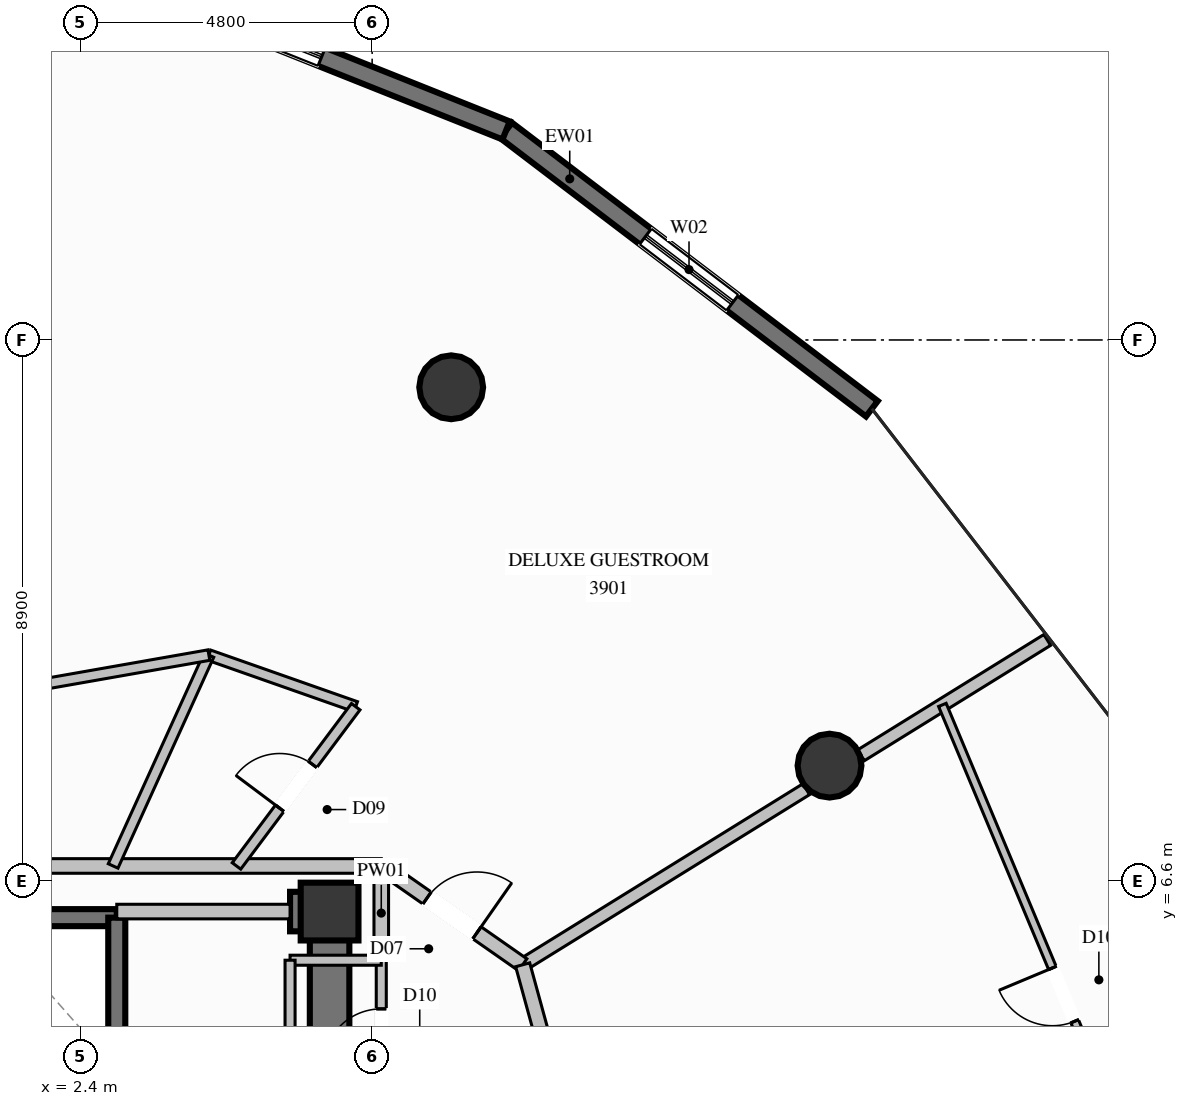
"""IFC4 building model, lengths in metres.
Left out: names, types, materials, properties, quantities, classifications, styles, units other than length and angle.
Written with IfcOpenShell. Run it as: python <this file> out.ifc"""

import sys

from ifc_helpers import new_model, si_unit, direction, frame, frame_2d, origin, origin_2d, place, context, subcontext, project, spatial, rectangle, circle, extrude, element, fill, save


model = new_model("IFC4")
c1 = context("Model", 3, precision=1e-05, world=origin(), true_north=direction((0.0, 1.0)))
c2 = subcontext(c1, "Body", "Model", "MODEL_VIEW")
j1 = project(units=[si_unit("LENGTHUNIT", "METRE"), si_unit("PLANEANGLEUNIT", "RADIAN")], contexts=[c1])
p1 = place(None, origin())
s1 = spatial("IfcSite", under=j1, at=p1, CompositionType="ELEMENT")
p2 = place(p1, origin())
s2 = spatial("IfcBuilding", under=s1, at=p2, CompositionType="ELEMENT")
p3 = place(p2, frame((0.0, 0.0, 145.8)))
s3 = spatial("IfcBuildingStorey", under=s2, at=p3, CompositionType="ELEMENT", Elevation=145.8)
p4 = place(p3, frame((6.5, 6.1, 0.0), z_axis=(0.0, 0.0, 1.0), x_axis=(1.0, 0.0, 0.0)))
e1 = element("IfcColumn", 1, at=p4, inside=s3, PredefinedType="COLUMN", context=c2, shape_type="SweptSolid", body=[
    extrude(rectangle(XDim=0.95, YDim=0.95, at=origin_2d()), origin(), (0.0, 0.0, 1.0), 3.6),
])
p5 = place(p3, frame((5.85, 6.1, 0.0), z_axis=(0.0, 0.0, 1.0), x_axis=(1.0, 0.0, 0.0)))
e2 = element("IfcWall", 2, at=p5, inside=s3, PredefinedType="SHEAR", context=c2, shape_type="SweptSolid", body=[
    extrude(rectangle(XDim=0.325, YDim=0.65, at=frame_2d((0.163, 0.0))), origin(), (0.0, 0.0, 1.0), 3.6),
])
p6 = place(p3, frame((6.5, 3.35, 0.0), z_axis=(0.0, 0.0, 1.0), x_axis=(0.0, 1.0, 0.0)))
e3 = element("IfcWall", 3, at=p6, inside=s3, PredefinedType="SHEAR", context=c2, shape_type="SweptSolid", body=[
    extrude(rectangle(XDim=3.075, YDim=0.65, at=frame_2d((1.538, 0.0))), origin(), (0.0, 0.0, 1.0), 3.6),
])
for number, where, z_axis, x_axis in (
    (4, (14.722, 8.5, 0.0), (0.0, 0.0, 1.0), (1.0, 0.0, 0.0)),
    (5, (8.5, 14.722, 0.0), (0.0, 0.0, 1.0), (1.0, 0.0, 0.0)),
):
    element("IfcColumn", number, at=place(p3, frame(where, z_axis=z_axis, x_axis=x_axis)), inside=s3, PredefinedType="COLUMN", context=c2, shape_type="SweptSolid", body=[
        extrude(circle(Radius=0.525, at=origin_2d()), origin(), (0.0, 0.0, 1.0), 3.6),
    ])
p7 = place(p3, frame((9.403, 18.946, 0.0), z_axis=(0.0, 0.0, 1.0), x_axis=(0.795837829304, -0.605509826054, 0.0)))
e6 = element("IfcWall", 6, at=p7, inside=s3, PredefinedType="SOLIDWALL", context=c2, shape_type="SweptSolid", body=[
    extrude(rectangle(XDim=7.559, YDim=0.32, at=frame_2d((3.78, 0.0))), origin(), (0.0, 0.0, 1.0), 3.35),
])
p8 = place(p7, frame((2.88, 0.0, 0.35)))
e7 = element("IfcOpeningElement", 7, at=p8, cuts=e6, PredefinedType="OPENING", context=c2, shape_type="SweptSolid", body=[
    extrude(rectangle(XDim=1.8, YDim=2.6, at=frame_2d((0.9, 1.3))), frame((0.0, 0.17, 0.0), z_axis=(0.0, -1.0, 0.0), x_axis=(1.0, 0.0, 0.0)), (0.0, 0.0, 1.0), 0.34),
])
p9 = place(p3, frame((2.58, 21.668, 0.0), z_axis=(0.0, 0.0, 1.0), x_axis=(0.928817816333, -0.37053672431, 0.0)))
e8 = element("IfcWall", 8, at=p9, inside=s3, PredefinedType="SOLIDWALL", context=c2, shape_type="SweptSolid", body=[
    extrude(rectangle(XDim=7.346, YDim=0.32, at=frame_2d((3.673, 0.0))), origin(), (0.0, 0.0, 1.0), 3.35),
])
p10 = place(p9, frame((2.28, 0.0, 0.35)))
e9 = element("IfcOpeningElement", 9, at=p10, cuts=e8, PredefinedType="OPENING", context=c2, shape_type="SweptSolid", body=[
    extrude(rectangle(XDim=1.8, YDim=2.6, at=frame_2d((0.9, 1.3))), frame((0.0, 0.17, 0.0), z_axis=(0.0, -1.0, 0.0), x_axis=(1.0, 0.0, 0.0)), (0.0, 0.0, 1.0), 0.34),
])
p11 = place(p3, frame((3.0, 6.0, 0.0), z_axis=(0.0, 0.0, 1.0), x_axis=(-1.0, 0.0, 0.0)))
e10 = element("IfcWall", 10, at=p11, inside=s3, PredefinedType="SOLIDWALL", context=c2, shape_type="SweptSolid", body=[
    extrude(rectangle(XDim=2.2, YDim=0.28, at=frame_2d((1.1, 0.0))), origin(), (0.0, 0.0, 1.0), 3.35),
])
p12 = place(p3, frame((3.0, 3.5, 0.0), z_axis=(0.0, 0.0, 1.0), x_axis=(0.0, 1.0, 0.0)))
e11 = element("IfcWall", 11, at=p12, inside=s3, PredefinedType="SOLIDWALL", context=c2, shape_type="SweptSolid", body=[
    extrude(rectangle(XDim=2.5, YDim=0.28, at=frame_2d((1.25, 0.0))), origin(), (0.0, 0.0, 1.0), 3.35),
])
p13 = place(p3, frame((-7.35, 6.85, 0.0), z_axis=(0.0, 0.0, 1.0), x_axis=(1.0, 0.0, 0.0)))
e12 = element("IfcWall", 12, at=p13, inside=s3, PredefinedType="PARTITIONING", context=c2, shape_type="SweptSolid", body=[
    extrude(rectangle(XDim=14.7, YDim=0.24, at=frame_2d((7.35, 0.0))), origin(), (0.0, 0.0, 1.0), 2.435),
])
p14 = place(p3, frame((7.35, 5.3, 0.0), z_axis=(0.0, 0.0, 1.0), x_axis=(0.0, 1.0, 0.0)))
e13 = element("IfcWall", 13, at=p14, inside=s3, PredefinedType="PARTITIONING", context=c2, shape_type="SweptSolid", body=[
    extrude(rectangle(XDim=1.55, YDim=0.24, at=frame_2d((0.775, 0.0))), origin(), (0.0, 0.0, 1.0), 2.435),
])
p15 = place(p3, frame((3.0, 6.1, 0.0), z_axis=(0.0, 0.0, 1.0), x_axis=(1.0, 0.0, 0.0)))
e14 = element("IfcWall", 14, at=p15, inside=s3, PredefinedType="PARTITIONING", context=c2, shape_type="SweptSolid", body=[
    extrude(rectangle(XDim=2.85, YDim=0.24, at=frame_2d((1.425, 0.0))), origin(), (0.0, 0.0, 1.0), 2.435),
])
p16 = place(p3, frame((7.35, 2.75, 0.0), z_axis=(0.0, 0.0, 1.0), x_axis=(0.0, 1.0, 0.0)))
e15 = element("IfcWall", 15, at=p16, inside=s3, PredefinedType="PARTITIONING", context=c2, shape_type="SweptSolid", body=[
    extrude(rectangle(XDim=2.55, YDim=0.165, at=frame_2d((1.275, 0.0))), origin(), (0.0, 0.0, 1.0), 3.35),
])
p17 = place(p16, frame((0.8, 0.0, 0.0)))
e16 = element("IfcOpeningElement", 16, at=p17, cuts=e15, PredefinedType="OPENING", context=c2, shape_type="SweptSolid", body=[
    extrude(rectangle(XDim=0.95, YDim=2.1, at=frame_2d((0.475, 1.05))), frame((0.0, 0.093, 0.0), z_axis=(0.0, -1.0, 0.0), x_axis=(1.0, 0.0, 0.0)), (0.0, 0.0, 1.0), 0.185),
])
p18 = place(p3, frame((7.35, 5.3, 0.0), z_axis=(0.0, 0.0, 1.0), x_axis=(-1.0, 0.0, 0.0)))
e17 = element("IfcWall", 17, at=p18, inside=s3, PredefinedType="PARTITIONING", context=c2, shape_type="SweptSolid", body=[
    extrude(rectangle(XDim=1.5, YDim=0.165, at=frame_2d((0.75, 0.0))), origin(), (0.0, 0.0, 1.0), 2.435),
])
p19 = place(p3, frame((5.85, 5.3, 0.0), z_axis=(0.0, 0.0, 1.0), x_axis=(0.0, -1.0, 0.0)))
e18 = element("IfcWall", 18, at=p19, inside=s3, PredefinedType="PARTITIONING", context=c2, shape_type="SweptSolid", body=[
    extrude(rectangle(XDim=2.55, YDim=0.165, at=frame_2d((1.275, 0.0))), origin(), (0.0, 0.0, 1.0), 2.435),
])
p20 = place(p3, frame((9.676, 5.225, 0.0), z_axis=(0.0, 0.0, 1.0), x_axis=(0.850241428679, 0.526392926394, 0.0)))
e19 = element("IfcWall", 19, at=p20, inside=s3, PredefinedType="PARTITIONING", context=c2, shape_type="SweptSolid", body=[
    extrude(rectangle(XDim=5.484, YDim=0.21, at=frame_2d((2.742, 0.0))), origin(), (0.0, 0.0, 1.0), 2.791),
])
p21 = place(p3, frame((15.24, 8.67, 0.0), z_axis=(0.0, 0.0, 1.0), x_axis=(0.850161151971, 0.526522569012, 0.0)))
e20 = element("IfcWall", 20, at=p21, inside=s3, PredefinedType="PARTITIONING", context=c2, shape_type="SweptSolid", body=[
    extrude(rectangle(XDim=3.603, YDim=0.21, at=frame_2d((1.801, 0.0))), origin(), (0.0, 0.0, 1.0), 3.35),
])
p22 = place(p3, frame((4.515, 10.318, 0.0), z_axis=(0.0, 0.0, 1.0), x_axis=(0.943387567364, -0.331692474655, 0.0)))
e21 = element("IfcWall", 21, at=p22, inside=s3, PredefinedType="PLUMBINGWALL", context=c2, shape_type="SweptSolid", body=[
    extrude(rectangle(XDim=2.56, YDim=0.175, at=frame_2d((1.28, 0.0))), origin(), (0.0, 0.0, 1.0), 3.35),
])
p23 = place(p3, frame((4.515, 10.318, 0.0), z_axis=(0.0, 0.0, 1.0), x_axis=(-0.413493846923, -0.910506912965, 0.0)))
e22 = element("IfcWall", 22, at=p23, inside=s3, PredefinedType="PLUMBINGWALL", context=c2, shape_type="SweptSolid", body=[
    extrude(rectangle(XDim=3.809, YDim=0.175, at=frame_2d((1.904, 0.0))), origin(), (0.0, 0.0, 1.0), 3.35),
])
p24 = place(p3, frame((4.969, 6.85, 0.0), z_axis=(0.0, 0.0, 1.0), x_axis=(0.599367014453, 0.800474348112, 0.0)))
e23 = element("IfcWall", 23, at=p24, inside=s3, PredefinedType="PLUMBINGWALL", context=c2, shape_type="SweptSolid", body=[
    extrude(rectangle(XDim=3.272, YDim=0.175, at=frame_2d((1.636, 0.0))), origin(), (0.0, 0.0, 1.0), 2.791),
])
p25 = place(p24, frame((1.186, 0.0, 0.0)))
e24 = element("IfcOpeningElement", 24, at=p25, cuts=e23, PredefinedType="OPENING", context=c2, shape_type="SweptSolid", body=[
    extrude(rectangle(XDim=0.9, YDim=2.1, at=frame_2d((0.45, 1.05))), frame((0.0, 0.098, 0.0), z_axis=(0.0, -1.0, 0.0), x_axis=(1.0, 0.0, 0.0)), (0.0, 0.0, 1.0), 0.195),
])
p26 = place(p3, frame((7.35, 6.85, 0.0), z_axis=(0.0, 0.0, 1.0), x_axis=(0.819753050647, -0.57271715179, 0.0)))
e25 = element("IfcWall", 25, at=p26, inside=s3, PredefinedType="PARTITIONING", context=c2, shape_type="SweptSolid", body=[
    extrude(rectangle(XDim=2.837, YDim=0.24, at=frame_2d((1.419, 0.0))), origin(), (0.0, 0.0, 1.0), 3.35),
])
p27 = place(p26, frame((0.919, 0.0, 0.0)))
e26 = element("IfcOpeningElement", 26, at=p27, cuts=e25, PredefinedType="OPENING", context=c2, shape_type="SweptSolid", body=[
    extrude(rectangle(XDim=1.0, YDim=2.2, at=frame_2d((0.5, 1.1))), frame((0.0, 0.13, 0.0), z_axis=(0.0, -1.0, 0.0), x_axis=(1.0, 0.0, 0.0)), (0.0, 0.0, 1.0), 0.26),
])
p28 = place(p3, frame((0.126, 9.547, 0.0), z_axis=(0.0, 0.0, 1.0), x_axis=(0.984918391832, 0.173019540602, 0.0)))
e27 = element("IfcWall", 27, at=p28, inside=s3, PredefinedType="PLUMBINGWALL", context=c2, shape_type="SweptSolid", body=[
    extrude(rectangle(XDim=4.456, YDim=0.175, at=frame_2d((2.228, 0.0))), origin(), (0.0, 0.0, 1.0), 3.35),
])
p29 = place(p3, frame((11.15, -0.15, 0.0), z_axis=(0.0, 0.0, 1.0), x_axis=(-0.264447801629, 0.964400000111, 0.0)))
e28 = element("IfcWall", 28, at=p29, inside=s3, PredefinedType="PARTITIONING", context=c2, shape_type="SweptSolid", body=[
    extrude(rectangle(XDim=5.573, YDim=0.24, at=frame_2d((2.787, 0.0))), origin(), (0.0, 0.0, 1.0), 2.985),
])
p30 = place(p3, frame((20.563, -0.03, 0.0), z_axis=(0.0, 0.0, 1.0), x_axis=(-0.385825151615, 0.922571922606, 0.0)))
e29 = element("IfcWall", 29, at=p30, inside=s3, PredefinedType="PARTITIONING", context=c2, shape_type="SweptSolid", body=[
    extrude(rectangle(XDim=10.329, YDim=0.135, at=frame_2d((5.165, 0.0))), origin(), (0.0, 0.0, 1.0), 3.35),
])
p31 = place(p30, frame((4.689, 0.0, 0.0)))
e30 = element("IfcOpeningElement", 30, at=p31, cuts=e29, PredefinedType="OPENING", context=c2, shape_type="SweptSolid", body=[
    extrude(rectangle(XDim=0.95, YDim=2.1, at=frame_2d((0.475, 1.05))), frame((0.0, 0.078, 0.0), z_axis=(0.0, -1.0, 0.0), x_axis=(1.0, 0.0, 0.0)), (0.0, 0.0, 1.0), 0.155),
])
p32 = place(p8, origin())
e31 = element("IfcWindow", 31, at=p32, inside=s3, PartitioningType="SINGLE_PANEL", PredefinedType="WINDOW", context=c2, shape_type="SweptSolid", body=[
    extrude(rectangle(XDim=1.8, YDim=2.6, at=frame_2d((0.9, 1.3))), frame((0.0, 0.03, 0.0), z_axis=(0.0, -1.0, 0.0), x_axis=(1.0, 0.0, 0.0)), (0.0, 0.0, 1.0), 0.06),
])
fill(e7, e31)
p33 = place(p10, origin())
e32 = element("IfcWindow", 32, at=p33, inside=s3, PartitioningType="SINGLE_PANEL", PredefinedType="WINDOW", context=c2, shape_type="SweptSolid", body=[
    extrude(rectangle(XDim=1.8, YDim=2.6, at=frame_2d((0.9, 1.3))), frame((0.0, 0.03, 0.0), z_axis=(0.0, -1.0, 0.0), x_axis=(1.0, 0.0, 0.0)), (0.0, 0.0, 1.0), 0.06),
])
fill(e9, e32)
p34 = place(p17, origin())
e33 = element("IfcDoor", 33, at=p34, inside=s3, OperationType="SINGLE_SWING_LEFT", PredefinedType="DOOR", context=c2, shape_type="SweptSolid", body=[
    extrude(rectangle(XDim=0.95, YDim=2.1, at=frame_2d((0.475, 1.05))), frame((0.0, 0.025, 0.0), z_axis=(0.0, -1.0, 0.0), x_axis=(1.0, 0.0, 0.0)), (0.0, 0.0, 1.0), 0.05),
])
fill(e16, e33)
p35 = place(p25, origin())
e34 = element("IfcDoor", 34, at=p35, inside=s3, OperationType="SINGLE_SWING_LEFT", PredefinedType="DOOR", context=c2, shape_type="SweptSolid", body=[
    extrude(rectangle(XDim=0.9, YDim=2.1, at=frame_2d((0.45, 1.05))), frame((0.0, 0.025, 0.0), z_axis=(0.0, -1.0, 0.0), x_axis=(1.0, 0.0, 0.0)), (0.0, 0.0, 1.0), 0.05),
])
fill(e24, e34)
p36 = place(p27, origin())
e35 = element("IfcDoor", 35, at=p36, inside=s3, OperationType="SINGLE_SWING_RIGHT", PredefinedType="DOOR", context=c2, shape_type="SweptSolid", body=[
    extrude(rectangle(XDim=1.0, YDim=2.2, at=frame_2d((0.5, 1.1))), frame((0.0, 0.025, 0.0), z_axis=(0.0, -1.0, 0.0), x_axis=(1.0, 0.0, 0.0)), (0.0, 0.0, 1.0), 0.05),
])
fill(e26, e35)
p37 = place(p31, origin())
e36 = element("IfcDoor", 36, at=p37, inside=s3, OperationType="SINGLE_SWING_RIGHT", PredefinedType="DOOR", context=c2, shape_type="SweptSolid", body=[
    extrude(rectangle(XDim=0.95, YDim=2.1, at=frame_2d((0.475, 1.05))), frame((0.0, 0.025, 0.0), z_axis=(0.0, -1.0, 0.0), x_axis=(1.0, 0.0, 0.0)), (0.0, 0.0, 1.0), 0.05),
])
fill(e30, e36)
save(model, sys.argv[1])
